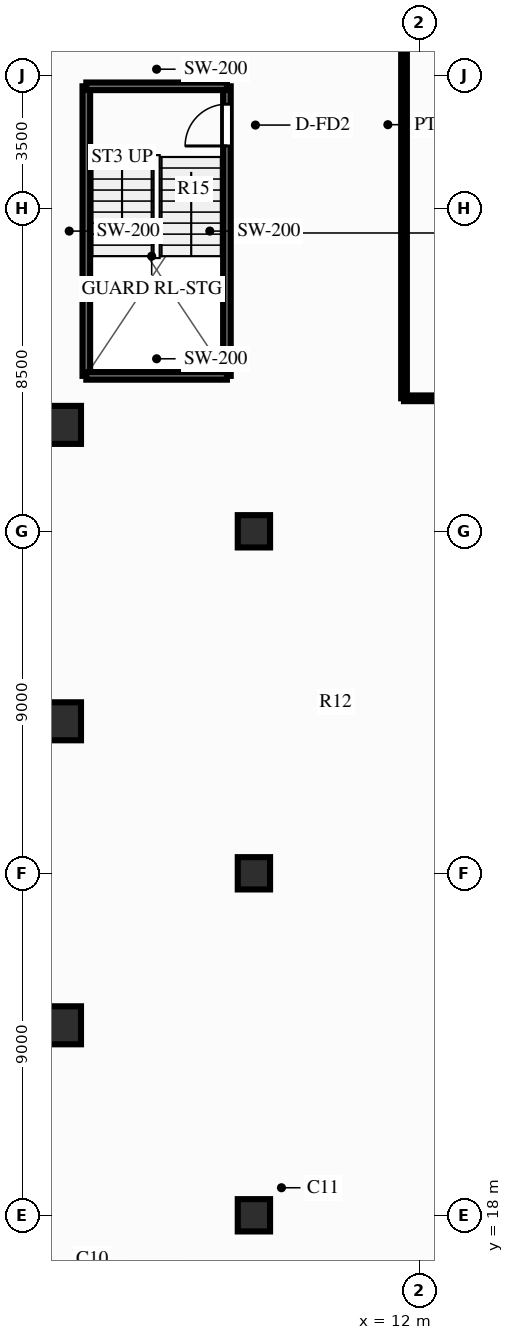
"""IFC4 building model, lengths in metres.
Left out: names, types, materials, properties, quantities, classifications, styles, units other than length and angle.
Written with IfcOpenShell. Run it as: python <this file> out.ifc"""

import sys

from ifc_helpers import new_model, si_unit, direction, frame, frame_2d, origin, origin_2d, place, context, subcontext, project, spatial, rectangle, circle, extrude, source, transform, mapped, element, fill, save


model = new_model("IFC4")
c1 = context("Model", 3, precision=1e-05, world=origin(), true_north=direction((0.0, 1.0)))
c2 = subcontext(c1, "Body", "Model", "MODEL_VIEW")
j1 = project(units=[si_unit("LENGTHUNIT", "METRE"), si_unit("PLANEANGLEUNIT", "RADIAN")], contexts=[c1])
p1 = place(None, origin())
s1 = spatial("IfcSite", under=j1, at=p1, CompositionType="ELEMENT")
p2 = place(p1, origin())
s2 = spatial("IfcBuilding", under=s1, at=p2, CompositionType="ELEMENT")
p3 = place(p2, frame((0.0, 0.0, 4.2)))
s3 = spatial("IfcBuildingStorey", under=s2, at=p3, CompositionType="ELEMENT", Elevation=4.2)
m1 = source(origin(), c2, "Body", "SweptSolid", [
    extrude(circle(Radius=0.5, at=origin_2d()), origin(), (0.0, 0.0, 1.0), 3.6),
])
for number, where, z_axis, x_axis in (
    (1, (2.6, 23.0, 0.0), (0.0, 0.0, 1.0), (1.0, 0.0, 0.0)),
    (2, (2.6, 31.0, 0.0), (0.0, 0.0, 1.0), (1.0, 0.0, 0.0)),
    (3, (2.6, 38.8, 0.0), (0.0, 0.0, 1.0), (1.0, 0.0, 0.0)),
):
    element("IfcColumn", number, at=place(p3, frame(where, z_axis=z_axis, x_axis=x_axis)), inside=s3, PredefinedType="COLUMN", context=c2, shape_type="MappedRepresentation", body=[
        mapped(m1, transform((0.0, 0.0, 0.0), scale=1.0)),
    ])
m2 = source(origin(), c2, "Body", "SweptSolid", [
    extrude(circle(Radius=0.425, at=origin_2d()), origin(), (0.0, 0.0, 1.0), 3.6),
])
for number, where, z_axis, x_axis in (
    (4, (7.65, 18.0, 0.0), (0.0, 0.0, 1.0), (1.0, 0.0, 0.0)),
    (5, (7.65, 27.0, 0.0), (0.0, 0.0, 1.0), (1.0, 0.0, 0.0)),
    (6, (7.65, 36.0, 0.0), (0.0, 0.0, 1.0), (1.0, 0.0, 0.0)),
):
    element("IfcColumn", number, at=place(p3, frame(where, z_axis=z_axis, x_axis=x_axis)), inside=s3, PredefinedType="COLUMN", context=c2, shape_type="MappedRepresentation", body=[
        mapped(m2, transform((0.0, 0.0, 0.0), scale=1.0)),
    ])
p4 = place(p3, frame((3.24, 40.09, 0.0), z_axis=(0.0, 0.0, 1.0), x_axis=(0.0, 1.0, 0.0)))
e7 = element("IfcWall", 7, at=p4, inside=s3, PredefinedType="SOLIDWALL", context=c2, shape_type="SweptSolid", body=[
    extrude(rectangle(XDim=7.62, YDim=0.2, at=frame_2d((3.81, 0.0))), origin(), (0.0, 0.0, 1.0), 3.32),
])
p5 = place(p3, frame((6.94, 40.09, 0.0), z_axis=(0.0, 0.0, 1.0), x_axis=(0.0, 1.0, 0.0)))
e8 = element("IfcWall", 8, at=p5, inside=s3, PredefinedType="SOLIDWALL", context=c2, shape_type="SweptSolid", body=[
    extrude(rectangle(XDim=7.62, YDim=0.2, at=frame_2d((3.81, 0.0))), origin(), (0.0, 0.0, 1.0), 3.32),
])
p6 = place(p5, frame((7.15, 0.0, 0.0), z_axis=(0.0, 0.0, 1.0), x_axis=(-1.0, 0.0, 0.0)))
e9 = element("IfcOpeningElement", 9, at=p6, cuts=e8, PredefinedType="OPENING", context=c2, shape_type="SweptSolid", body=[
    extrude(rectangle(XDim=1.1, YDim=2.15, at=frame_2d((0.55, 1.075))), frame((0.0, 0.112, 0.0), z_axis=(0.0, -1.0, 0.0), x_axis=(1.0, 0.0, 0.0)), (0.0, 0.0, 1.0), 0.224),
])
for number, where, z_axis, x_axis in (
    (10, (3.24, 40.09, 0.0), (0.0, 0.0, 1.0), (1.0, 0.0, 0.0)),
    (11, (3.24, 47.71, 0.0), (0.0, 0.0, 1.0), (1.0, 0.0, 0.0)),
):
    element("IfcWall", number, at=place(p3, frame(where, z_axis=z_axis, x_axis=x_axis)), inside=s3, PredefinedType="SOLIDWALL", context=c2, shape_type="SweptSolid", body=[
        extrude(rectangle(XDim=3.7, YDim=0.2, at=frame_2d((1.85, 0.0))), origin(), (0.0, 0.0, 1.0), 3.32),
    ])
p7 = place(p3, frame((11.6, 39.5, 0.0), z_axis=(0.0, 0.0, 1.0), x_axis=(1.0, 0.0, 0.0)))
e12 = element("IfcWall", 12, at=p7, inside=s3, PredefinedType="PARTITIONING", context=c2, shape_type="SweptSolid", body=[
    extrude(rectangle(XDim=24.4, YDim=0.15, at=frame_2d((12.2, 0.0))), origin(), (0.0, 0.0, 1.0), 3.32),
])
p8 = place(p7, frame((9.47, 0.0, 0.0)))
e13 = element("IfcOpeningElement", 13, at=p8, cuts=e12, PredefinedType="OPENING", context=c2, shape_type="SweptSolid", body=[
    extrude(rectangle(XDim=1.25, YDim=2.15, at=frame_2d((0.625, 1.075))), frame((0.0, 0.087, 0.0), z_axis=(0.0, -1.0, 0.0), x_axis=(1.0, 0.0, 0.0)), (0.0, 0.0, 1.0), 0.174),
])
p9 = place(p3, frame((11.6, 39.5, 0.0), z_axis=(0.0, 0.0, 1.0), x_axis=(0.0, 1.0, 0.0)))
e14 = element("IfcWall", 14, at=p9, inside=s3, PredefinedType="PARTITIONING", context=c2, shape_type="SweptSolid", body=[
    extrude(rectangle(XDim=14.4, YDim=0.15, at=frame_2d((7.2, 0.0))), origin(), (0.0, 0.0, 1.0), 3.32),
])
m3 = source(origin(), c2, "Body", "SweptSolid", [
    extrude(rectangle(XDim=1.1, YDim=2.15, at=frame_2d((0.55, 1.075))), frame((0.0, 0.025, 0.0), z_axis=(0.0, -1.0, 0.0), x_axis=(1.0, 0.0, 0.0)), (0.0, 0.0, 1.0), 0.05),
])
p10 = place(p6, origin())
e15 = element("IfcDoor", 15, at=p10, inside=s3, OperationType="SINGLE_SWING_RIGHT", PredefinedType="DOOR", context=c2, shape_type="MappedRepresentation", body=[
    mapped(m3, transform((0.0, 0.0, 0.0), scale=1.0)),
])
fill(e9, e15)
save(model, sys.argv[1])
